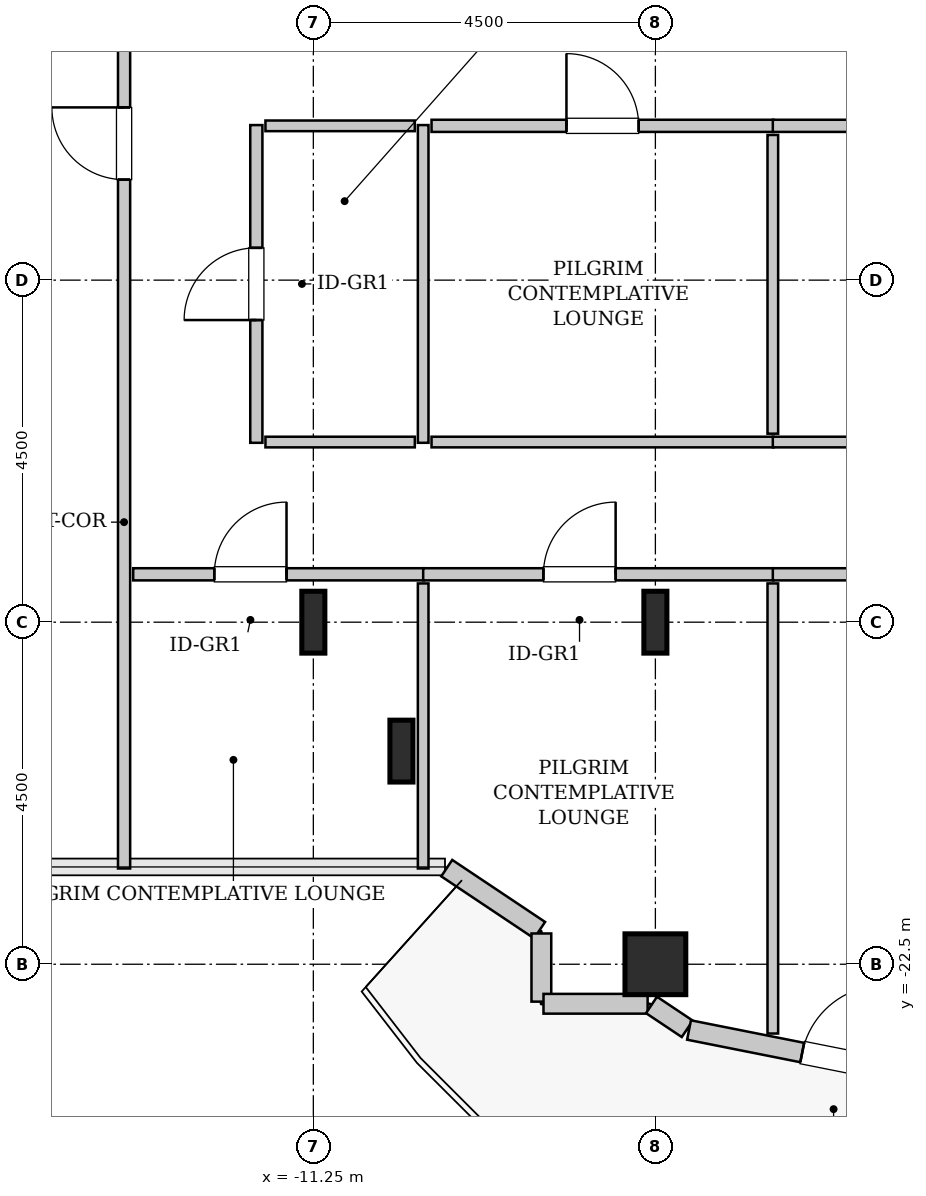
"""IFC4 building model, lengths in metres.
Left out: names, types, materials, properties, quantities, classifications, styles, units other than length and angle.
Written with IfcOpenShell. Run it as: python <this file> out.ifc"""

import sys

from ifc_helpers import new_model, si_unit, direction, frame, frame_2d, origin, origin_2d, place, context, subcontext, project, spatial, rectangle, hollow_rectangle, i_section, extrude, source, transform, mapped, element, fill, save


model = new_model("IFC4")
c1 = context("Model", 3, precision=1e-05, world=origin(), true_north=direction((0.0, 1.0)))
c2 = subcontext(c1, "Body", "Model", "MODEL_VIEW")
j1 = project(units=[si_unit("LENGTHUNIT", "METRE"), si_unit("PLANEANGLEUNIT", "RADIAN")], contexts=[c1])
p1 = place(None, origin())
s1 = spatial("IfcSite", under=j1, at=p1, CompositionType="ELEMENT")
p2 = place(p1, origin())
s2 = spatial("IfcBuilding", under=s1, at=p2, CompositionType="ELEMENT")
p3 = place(p2, frame((0.0, 0.0, 171.6)))
s3 = spatial("IfcBuildingStorey", under=s2, at=p3, CompositionType="ELEMENT", Elevation=171.6)
m1 = source(origin(), c2, "Body", "SweptSolid", [
    extrude(i_section(OverallWidth=0.303, OverallDepth=0.814, WebThickness=0.021, FlangeThickness=0.04, FilletRadius=0.03, at=origin_2d()), origin(), (0.0, 0.0, 1.0), 3.8),
])
for number, where, z_axis, x_axis in (
    (1, (-11.25, -18.0, 0.0), (0.0, 0.0, 1.0), (1.0, 0.0, 0.0)),
    (2, (-10.091, -19.696, 0.0), (0.0, 0.0, 1.0), (1.0, 0.0, 0.0)),
):
    element("IfcColumn", number, at=place(p3, frame(where, z_axis=z_axis, x_axis=x_axis)), inside=s3, PredefinedType="COLUMN", context=c2, shape_type="MappedRepresentation", body=[
        mapped(m1, transform((0.0, 0.0, 0.0), x_axis=(1.0, 0.0, 0.0), y_axis=(0.0, 1.0, 0.0), z_axis=(0.0, 0.0, 1.0), scale=1.0)),
    ])
m2 = source(origin(), c2, "Body", "SweptSolid", [
    extrude(hollow_rectangle(XDim=0.8, YDim=0.8, WallThickness=0.04, InnerFilletRadius=0.04, OuterFilletRadius=0.08, at=origin_2d()), origin(), (0.0, 0.0, 1.0), 3.8),
])
p4 = place(p3, frame((-6.75, -22.5, 0.0), z_axis=(0.0, 0.0, 1.0), x_axis=(1.0, 0.0, 0.0)))
e3 = element("IfcColumn", 3, at=p4, inside=s3, PredefinedType="COLUMN", context=c2, shape_type="MappedRepresentation", body=[
    mapped(m2, transform((0.0, 0.0, 0.0), x_axis=(1.0, 0.0, 0.0), y_axis=(0.0, 1.0, 0.0), z_axis=(0.0, 0.0, 1.0), scale=1.0)),
])
p5 = place(p3, frame((-6.75, -18.0, 0.0), z_axis=(0.0, 0.0, 1.0), x_axis=(1.0, 0.0, 0.0)))
e4 = element("IfcColumn", 4, at=p5, inside=s3, PredefinedType="COLUMN", context=c2, shape_type="MappedRepresentation", body=[
    mapped(m1, transform((0.0, 0.0, 0.0), x_axis=(1.0, 0.0, 0.0), y_axis=(0.0, 1.0, 0.0), z_axis=(0.0, 0.0, 1.0), scale=1.0)),
])
m3 = source(origin(), c2, "Body", "SweptSolid", [
    extrude(rectangle(XDim=1.469, YDim=0.26, at=frame_2d((0.734, 0.0))), origin(), (0.0, 0.0, 1.0), 3.55),
])
p6 = place(p3, frame((-9.495, -21.236, 0.0), z_axis=(0.0, 0.0, 1.0), x_axis=(0.831461760506, -0.555581983884, 0.0)))
e5 = element("IfcWall", 5, at=p6, inside=s3, PredefinedType="SOLIDWALL", context=c2, shape_type="MappedRepresentation", body=[
    mapped(m3, transform((0.0, 0.0, 0.0), x_axis=(1.0, 0.0, 0.0), y_axis=(0.0, 1.0, 0.0), z_axis=(0.0, 0.0, 1.0), scale=1.0)),
])
m4 = source(origin(), c2, "Body", "SweptSolid", [
    extrude(rectangle(XDim=0.897, YDim=0.26, at=frame_2d((0.448, 0.0))), origin(), (0.0, 0.0, 1.0), 3.55),
])
p7 = place(p3, frame((-8.25, -22.095, 0.0), z_axis=(0.0, 0.0, 1.0), x_axis=(0.0, -1.0, 0.0)))
e6 = element("IfcWall", 6, at=p7, inside=s3, PredefinedType="SOLIDWALL", context=c2, shape_type="MappedRepresentation", body=[
    mapped(m4, transform((0.0, 0.0, 0.0), x_axis=(1.0, 0.0, 0.0), y_axis=(0.0, 1.0, 0.0), z_axis=(0.0, 0.0, 1.0), scale=1.0)),
])
m5 = source(origin(), c2, "Body", "SweptSolid", [
    extrude(rectangle(XDim=1.37, YDim=0.26, at=frame_2d((0.685, 0.0))), origin(), (0.0, 0.0, 1.0), 3.55),
])
p8 = place(p3, frame((-8.222, -23.02, 0.0), z_axis=(0.0, 0.0, 1.0), x_axis=(1.0, 0.0, 0.0)))
e7 = element("IfcWall", 7, at=p8, inside=s3, PredefinedType="SOLIDWALL", context=c2, shape_type="MappedRepresentation", body=[
    mapped(m5, transform((0.0, 0.0, 0.0), x_axis=(1.0, 0.0, 0.0), y_axis=(0.0, 1.0, 0.0), z_axis=(0.0, 0.0, 1.0), scale=1.0)),
])
m6 = source(origin(), c2, "Body", "SweptSolid", [
    extrude(rectangle(XDim=0.565, YDim=0.26, at=frame_2d((0.283, 0.0))), origin(), (0.0, 0.0, 1.0), 3.55),
])
p9 = place(p3, frame((-6.801, -23.036, 0.0), z_axis=(0.0, 0.0, 1.0), x_axis=(0.831651492666, -0.555297933317, 0.0)))
e8 = element("IfcWall", 8, at=p9, inside=s3, PredefinedType="SOLIDWALL", context=c2, shape_type="MappedRepresentation", body=[
    mapped(m6, transform((0.0, 0.0, 0.0), x_axis=(1.0, 0.0, 0.0), y_axis=(0.0, 1.0, 0.0), z_axis=(0.0, 0.0, 1.0), scale=1.0)),
])
m7 = source(origin(), c2, "Body", "SweptSolid", [
    extrude(rectangle(XDim=4.137, YDim=0.26, at=frame_2d((2.068, 0.0))), origin(), (0.0, 0.0, 1.0), 3.55),
])
p10 = place(p3, frame((-6.307, -23.365, 0.0), z_axis=(0.0, 0.0, 1.0), x_axis=(0.980782170794, -0.195105954428, 0.0)))
e9 = element("IfcWall", 9, at=p10, inside=s3, PredefinedType="SOLIDWALL", context=c2, shape_type="MappedRepresentation", body=[
    mapped(m7, transform((0.0, 0.0, 0.0), x_axis=(1.0, 0.0, 0.0), y_axis=(0.0, 1.0, 0.0), z_axis=(0.0, 0.0, 1.0), scale=1.0)),
])
p11 = place(p10, frame((1.518, 0.0, 0.0)))
e10 = element("IfcOpeningElement", 10, at=p11, cuts=e9, PredefinedType="OPENING", context=c2, shape_type="SweptSolid", body=[
    extrude(rectangle(XDim=1.1, YDim=2.2, at=frame_2d((0.55, 1.1))), frame((0.0, 0.14, 0.0), z_axis=(0.0, -1.0, 0.0), x_axis=(1.0, 0.0, 0.0)), (0.0, 0.0, 1.0), 0.28),
])
m8 = source(origin(), c2, "Body", "SweptSolid", [
    extrude(rectangle(XDim=15.245, YDim=0.16, at=frame_2d((7.623, 0.0))), origin(), (0.0, 0.0, 1.0), 3.535),
])
p12 = place(p3, frame((-13.74, -21.24, 0.0), z_axis=(0.0, 0.0, 1.0), x_axis=(0.0, 1.0, 0.0)))
e11 = element("IfcWall", 11, at=p12, inside=s3, PredefinedType="PARTITIONING", context=c2, shape_type="MappedRepresentation", body=[
    mapped(m8, transform((0.0, 0.0, 0.0), x_axis=(1.0, 0.0, 0.0), y_axis=(0.0, 1.0, 0.0), z_axis=(0.0, 0.0, 1.0), scale=1.0)),
])
p13 = place(p12, frame((9.062, 0.0, 0.0)))
e12 = element("IfcOpeningElement", 12, at=p13, cuts=e11, PredefinedType="OPENING", context=c2, shape_type="SweptSolid", body=[
    extrude(rectangle(XDim=0.95, YDim=2.1, at=frame_2d((0.475, 1.05))), frame((0.0, 0.09, 0.0), z_axis=(0.0, -1.0, 0.0), x_axis=(1.0, 0.0, 0.0)), (0.0, 0.0, 1.0), 0.18),
])
m9 = source(origin(), c2, "Body", "SweptSolid", [
    extrude(rectangle(XDim=3.825, YDim=0.16, at=frame_2d((1.913, 0.0))), origin(), (0.0, 0.0, 1.0), 3.535),
])
p14 = place(p3, frame((-13.62, -17.37, 0.0), z_axis=(0.0, 0.0, 1.0), x_axis=(1.0, 0.0, 0.0)))
e13 = element("IfcWall", 13, at=p14, inside=s3, PredefinedType="PARTITIONING", context=c2, shape_type="MappedRepresentation", body=[
    mapped(m9, transform((0.0, 0.0, 0.0), x_axis=(1.0, 0.0, 0.0), y_axis=(0.0, 1.0, 0.0), z_axis=(0.0, 0.0, 1.0), scale=1.0)),
])
p15 = place(p14, frame((1.067, 0.0, 0.0)))
e14 = element("IfcOpeningElement", 14, at=p15, cuts=e13, PredefinedType="OPENING", context=c2, shape_type="SweptSolid", body=[
    extrude(rectangle(XDim=0.95, YDim=2.1, at=frame_2d((0.475, 1.05))), frame((0.0, 0.09, 0.0), z_axis=(0.0, -1.0, 0.0), x_axis=(1.0, 0.0, 0.0)), (0.0, 0.0, 1.0), 0.18),
])
m10 = source(origin(), c2, "Body", "SweptSolid", [
    extrude(rectangle(XDim=3.75, YDim=0.14, at=frame_2d((1.875, 0.0))), origin(), (0.0, 0.0, 1.0), 3.535),
])
p16 = place(p3, frame((-9.805, -21.24, 0.0), z_axis=(0.0, 0.0, 1.0), x_axis=(0.0, 1.0, 0.0)))
e15 = element("IfcWall", 15, at=p16, inside=s3, PredefinedType="PARTITIONING", context=c2, shape_type="MappedRepresentation", body=[
    mapped(m10, transform((0.0, 0.0, 0.0), x_axis=(1.0, 0.0, 0.0), y_axis=(0.0, 1.0, 0.0), z_axis=(0.0, 0.0, 1.0), scale=1.0)),
])
m11 = source(origin(), c2, "Body", "SweptSolid", [
    extrude(rectangle(XDim=4.18, YDim=0.16, at=frame_2d((2.09, 0.0))), origin(), (0.0, 0.0, 1.0), 3.535),
])
p17 = place(p3, frame((-12.0, -15.64, 0.0), z_axis=(0.0, 0.0, 1.0), x_axis=(0.0, 1.0, 0.0)))
e16 = element("IfcWall", 16, at=p17, inside=s3, PredefinedType="PARTITIONING", context=c2, shape_type="MappedRepresentation", body=[
    mapped(m11, transform((0.0, 0.0, 0.0), x_axis=(1.0, 0.0, 0.0), y_axis=(0.0, 1.0, 0.0), z_axis=(0.0, 0.0, 1.0), scale=1.0)),
])
p18 = place(p17, frame((1.615, 0.0, 0.0)))
e17 = element("IfcOpeningElement", 17, at=p18, cuts=e16, PredefinedType="OPENING", context=c2, shape_type="SweptSolid", body=[
    extrude(rectangle(XDim=0.95, YDim=2.1, at=frame_2d((0.475, 1.05))), frame((0.0, 0.09, 0.0), z_axis=(0.0, -1.0, 0.0), x_axis=(1.0, 0.0, 0.0)), (0.0, 0.0, 1.0), 0.18),
])
m12 = source(origin(), c2, "Body", "SweptSolid", [
    extrude(rectangle(XDim=4.18, YDim=0.14, at=frame_2d((2.09, 0.0))), origin(), (0.0, 0.0, 1.0), 3.535),
])
p19 = place(p3, frame((-9.805, -15.64, 0.0), z_axis=(0.0, 0.0, 1.0), x_axis=(0.0, 1.0, 0.0)))
e18 = element("IfcWall", 18, at=p19, inside=s3, PredefinedType="PARTITIONING", context=c2, shape_type="MappedRepresentation", body=[
    mapped(m12, transform((0.0, 0.0, 0.0), x_axis=(1.0, 0.0, 0.0), y_axis=(0.0, 1.0, 0.0), z_axis=(0.0, 0.0, 1.0), scale=1.0)),
])
m13 = source(origin(), c2, "Body", "SweptSolid", [
    extrude(rectangle(XDim=1.965, YDim=0.14, at=frame_2d((0.982, 0.0))), origin(), (0.0, 0.0, 1.0), 3.535),
])
for number, where, z_axis, x_axis in (
    (19, (-11.88, -11.47, 0.0), (0.0, 0.0, 1.0), (1.0, 0.0, 0.0)),
    (20, (-11.88, -15.63, 0.0), (0.0, 0.0, 1.0), (1.0, 0.0, 0.0)),
):
    element("IfcWall", number, at=place(p3, frame(where, z_axis=z_axis, x_axis=x_axis)), inside=s3, PredefinedType="PARTITIONING", context=c2, shape_type="MappedRepresentation", body=[
        mapped(m13, transform((0.0, 0.0, 0.0), x_axis=(1.0, 0.0, 0.0), y_axis=(0.0, 1.0, 0.0), z_axis=(0.0, 0.0, 1.0), scale=1.0)),
    ])
m14 = source(origin(), c2, "Body", "SweptSolid", [
    extrude(rectangle(XDim=4.61, YDim=0.16, at=frame_2d((2.305, 0.0))), origin(), (0.0, 0.0, 1.0), 3.535),
])
p20 = place(p3, frame((-9.805, -17.37, 0.0), z_axis=(0.0, 0.0, 1.0), x_axis=(1.0, 0.0, 0.0)))
e21 = element("IfcWall", 21, at=p20, inside=s3, PredefinedType="PARTITIONING", context=c2, shape_type="MappedRepresentation", body=[
    mapped(m14, transform((0.0, 0.0, 0.0), x_axis=(1.0, 0.0, 0.0), y_axis=(0.0, 1.0, 0.0), z_axis=(0.0, 0.0, 1.0), scale=1.0)),
])
p21 = place(p20, frame((1.582, 0.0, 0.0)))
e22 = element("IfcOpeningElement", 22, at=p21, cuts=e21, PredefinedType="OPENING", context=c2, shape_type="SweptSolid", body=[
    extrude(rectangle(XDim=0.95, YDim=2.1, at=frame_2d((0.475, 1.05))), frame((0.0, 0.09, 0.0), z_axis=(0.0, -1.0, 0.0), x_axis=(1.0, 0.0, 0.0)), (0.0, 0.0, 1.0), 0.18),
])
m15 = source(origin(), c2, "Body", "SweptSolid", [
    extrude(rectangle(XDim=5.922, YDim=0.14, at=frame_2d((2.961, 0.0))), origin(), (0.0, 0.0, 1.0), 3.535),
])
p22 = place(p3, frame((-5.205, -23.412, 0.0), z_axis=(0.0, 0.0, 1.0), x_axis=(0.0, 1.0, 0.0)))
e23 = element("IfcWall", 23, at=p22, inside=s3, PredefinedType="PARTITIONING", context=c2, shape_type="MappedRepresentation", body=[
    mapped(m15, transform((0.0, 0.0, 0.0), x_axis=(1.0, 0.0, 0.0), y_axis=(0.0, 1.0, 0.0), z_axis=(0.0, 0.0, 1.0), scale=1.0)),
])
m16 = source(origin(), c2, "Body", "SweptSolid", [
    extrude(rectangle(XDim=4.5, YDim=0.16, at=frame_2d((2.25, 0.0))), origin(), (0.0, 0.0, 1.0), 3.535),
])
p23 = place(p3, frame((-9.695, -11.47, 0.0), z_axis=(0.0, 0.0, 1.0), x_axis=(1.0, 0.0, 0.0)))
e24 = element("IfcWall", 24, at=p23, inside=s3, PredefinedType="PARTITIONING", context=c2, shape_type="MappedRepresentation", body=[
    mapped(m16, transform((0.0, 0.0, 0.0), x_axis=(1.0, 0.0, 0.0), y_axis=(0.0, 1.0, 0.0), z_axis=(0.0, 0.0, 1.0), scale=1.0)),
])
p24 = place(p23, frame((1.775, 0.0, 0.0)))
e25 = element("IfcOpeningElement", 25, at=p24, cuts=e24, PredefinedType="OPENING", context=c2, shape_type="SweptSolid", body=[
    extrude(rectangle(XDim=0.95, YDim=2.1, at=frame_2d((0.475, 1.05))), frame((0.0, 0.09, 0.0), z_axis=(0.0, -1.0, 0.0), x_axis=(1.0, 0.0, 0.0)), (0.0, 0.0, 1.0), 0.18),
])
m17 = source(origin(), c2, "Body", "SweptSolid", [
    extrude(rectangle(XDim=4.5, YDim=0.14, at=frame_2d((2.25, 0.0))), origin(), (0.0, 0.0, 1.0), 3.535),
])
p25 = place(p3, frame((-9.695, -15.63, 0.0), z_axis=(0.0, 0.0, 1.0), x_axis=(1.0, 0.0, 0.0)))
e26 = element("IfcWall", 26, at=p25, inside=s3, PredefinedType="PARTITIONING", context=c2, shape_type="MappedRepresentation", body=[
    mapped(m17, transform((0.0, 0.0, 0.0), x_axis=(1.0, 0.0, 0.0), y_axis=(0.0, 1.0, 0.0), z_axis=(0.0, 0.0, 1.0), scale=1.0)),
])
m18 = source(origin(), c2, "Body", "SweptSolid", [
    extrude(rectangle(XDim=3.93, YDim=0.14, at=frame_2d((1.965, 0.0))), origin(), (0.0, 0.0, 1.0), 3.535),
])
p26 = place(p3, frame((-5.205, -15.52, 0.0), z_axis=(0.0, 0.0, 1.0), x_axis=(0.0, 1.0, 0.0)))
e27 = element("IfcWall", 27, at=p26, inside=s3, PredefinedType="PARTITIONING", context=c2, shape_type="MappedRepresentation", body=[
    mapped(m18, transform((0.0, 0.0, 0.0), x_axis=(1.0, 0.0, 0.0), y_axis=(0.0, 1.0, 0.0), z_axis=(0.0, 0.0, 1.0), scale=1.0)),
])
m19 = source(origin(), c2, "Body", "SweptSolid", [
    extrude(rectangle(XDim=7.01, YDim=0.16, at=frame_2d((3.505, 0.0))), origin(), (0.0, 0.0, 1.0), 3.535),
])
p27 = place(p3, frame((-5.205, -17.37, 0.0), z_axis=(0.0, 0.0, 1.0), x_axis=(1.0, 0.0, 0.0)))
e28 = element("IfcWall", 28, at=p27, inside=s3, PredefinedType="PARTITIONING", context=c2, shape_type="MappedRepresentation", body=[
    mapped(m19, transform((0.0, 0.0, 0.0), x_axis=(1.0, 0.0, 0.0), y_axis=(0.0, 1.0, 0.0), z_axis=(0.0, 0.0, 1.0), scale=1.0)),
])
p28 = place(p27, frame((3.47, 0.0, 0.0)))
e29 = element("IfcOpeningElement", 29, at=p28, cuts=e28, PredefinedType="OPENING", context=c2, shape_type="SweptSolid", body=[
    extrude(rectangle(XDim=0.95, YDim=2.1, at=frame_2d((0.475, 1.05))), frame((0.0, 0.09, 0.0), z_axis=(0.0, -1.0, 0.0), x_axis=(1.0, 0.0, 0.0)), (0.0, 0.0, 1.0), 0.18),
])
p29 = place(p3, frame((-5.205, -11.47, 0.0), z_axis=(0.0, 0.0, 1.0), x_axis=(1.0, 0.0, 0.0)))
e30 = element("IfcWall", 30, at=p29, inside=s3, PredefinedType="PARTITIONING", context=c2, shape_type="MappedRepresentation", body=[
    mapped(m19, transform((0.0, 0.0, 0.0), x_axis=(1.0, 0.0, 0.0), y_axis=(0.0, 1.0, 0.0), z_axis=(0.0, 0.0, 1.0), scale=1.0)),
])
p30 = place(p29, frame((3.03, 0.0, 0.0)))
e31 = element("IfcOpeningElement", 31, at=p30, cuts=e30, PredefinedType="OPENING", context=c2, shape_type="SweptSolid", body=[
    extrude(rectangle(XDim=0.95, YDim=2.1, at=frame_2d((0.475, 1.05))), frame((0.0, 0.09, 0.0), z_axis=(0.0, -1.0, 0.0), x_axis=(1.0, 0.0, 0.0)), (0.0, 0.0, 1.0), 0.18),
])
m20 = source(origin(), c2, "Body", "SweptSolid", [
    extrude(rectangle(XDim=7.01, YDim=0.14, at=frame_2d((3.505, 0.0))), origin(), (0.0, 0.0, 1.0), 3.535),
])
p31 = place(p3, frame((-5.205, -15.63, 0.0), z_axis=(0.0, 0.0, 1.0), x_axis=(1.0, 0.0, 0.0)))
e32 = element("IfcWall", 32, at=p31, inside=s3, PredefinedType="PARTITIONING", context=c2, shape_type="MappedRepresentation", body=[
    mapped(m20, transform((0.0, 0.0, 0.0), x_axis=(1.0, 0.0, 0.0), y_axis=(0.0, 1.0, 0.0), z_axis=(0.0, 0.0, 1.0), scale=1.0)),
])
m21 = source(origin(), c2, "Body", "SweptSolid", [
    extrude(rectangle(XDim=1.1, YDim=2.2, at=frame_2d((0.55, 1.1))), frame((0.0, 0.025, 0.0), z_axis=(0.0, -1.0, 0.0), x_axis=(1.0, 0.0, 0.0)), (0.0, 0.0, 1.0), 0.05),
])
p32 = place(p11, origin())
e33 = element("IfcDoor", 33, at=p32, inside=s3, OperationType="SINGLE_SWING_RIGHT", PredefinedType="DOOR", context=c2, shape_type="MappedRepresentation", body=[
    mapped(m21, transform((0.0, 0.0, 0.0), x_axis=(1.0, 0.0, 0.0), y_axis=(0.0, 1.0, 0.0), z_axis=(0.0, 0.0, 1.0), scale=1.0)),
])
fill(e10, e33)
m22 = source(origin(), c2, "Body", "SweptSolid", [
    extrude(rectangle(XDim=0.95, YDim=2.1, at=frame_2d((0.475, 1.05))), frame((0.0, 0.025, 0.0), z_axis=(0.0, -1.0, 0.0), x_axis=(1.0, 0.0, 0.0)), (0.0, 0.0, 1.0), 0.05),
])
p33 = place(p13, origin())
e34 = element("IfcDoor", 34, at=p33, inside=s3, OperationType="SINGLE_SWING_RIGHT", PredefinedType="DOOR", context=c2, shape_type="MappedRepresentation", body=[
    mapped(m22, transform((0.0, 0.0, 0.0), x_axis=(1.0, 0.0, 0.0), y_axis=(0.0, 1.0, 0.0), z_axis=(0.0, 0.0, 1.0), scale=1.0)),
])
fill(e12, e34)
p34 = place(p15, origin())
e35 = element("IfcDoor", 35, at=p34, inside=s3, OperationType="SINGLE_SWING_RIGHT", PredefinedType="DOOR", context=c2, shape_type="MappedRepresentation", body=[
    mapped(m22, transform((0.0, 0.0, 0.0), x_axis=(1.0, 0.0, 0.0), y_axis=(0.0, 1.0, 0.0), z_axis=(0.0, 0.0, 1.0), scale=1.0)),
])
fill(e14, e35)
p35 = place(p18, origin())
e36 = element("IfcDoor", 36, at=p35, inside=s3, OperationType="SINGLE_SWING_LEFT", PredefinedType="DOOR", context=c2, shape_type="MappedRepresentation", body=[
    mapped(m22, transform((0.0, 0.0, 0.0), x_axis=(1.0, 0.0, 0.0), y_axis=(0.0, 1.0, 0.0), z_axis=(0.0, 0.0, 1.0), scale=1.0)),
])
fill(e17, e36)
p36 = place(p21, origin())
e37 = element("IfcDoor", 37, at=p36, inside=s3, OperationType="SINGLE_SWING_RIGHT", PredefinedType="DOOR", context=c2, shape_type="MappedRepresentation", body=[
    mapped(m22, transform((0.0, 0.0, 0.0), x_axis=(1.0, 0.0, 0.0), y_axis=(0.0, 1.0, 0.0), z_axis=(0.0, 0.0, 1.0), scale=1.0)),
])
fill(e22, e37)
p37 = place(p24, origin())
e38 = element("IfcDoor", 38, at=p37, inside=s3, OperationType="SINGLE_SWING_LEFT", PredefinedType="DOOR", context=c2, shape_type="MappedRepresentation", body=[
    mapped(m22, transform((0.0, 0.0, 0.0), x_axis=(1.0, 0.0, 0.0), y_axis=(0.0, 1.0, 0.0), z_axis=(0.0, 0.0, 1.0), scale=1.0)),
])
fill(e25, e38)
save(model, sys.argv[1])
